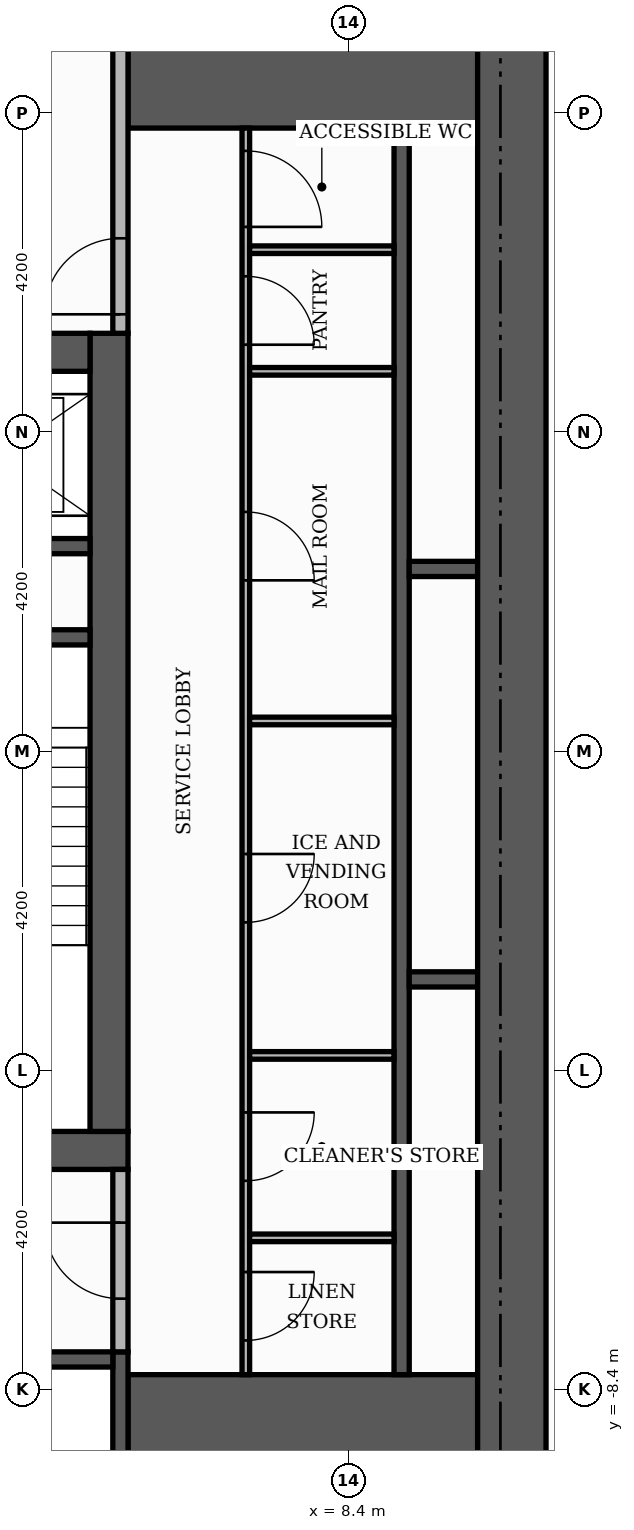
"""IFC4 building model, lengths in metres.
Left out: names, types, materials, properties, quantities, classifications, styles, units other than length and angle.
Written with IfcOpenShell. Run it as: python <this file> out.ifc"""

import sys

from ifc_helpers import new_model, si_unit, direction, frame, frame_2d, origin, place, context, subcontext, project, spatial, rectangle, extrude, element, fill, save


model = new_model("IFC4")
c1 = context("Model", 3, precision=1e-05, world=origin(), true_north=direction((0.0, 1.0)))
c2 = subcontext(c1, "Body", "Model", "MODEL_VIEW")
j1 = project(units=[si_unit("LENGTHUNIT", "METRE"), si_unit("PLANEANGLEUNIT", "RADIAN")], contexts=[c1])
p1 = place(None, origin())
s1 = spatial("IfcSite", under=j1, at=p1, CompositionType="ELEMENT")
p2 = place(p1, origin())
s2 = spatial("IfcBuilding", under=s1, at=p2, CompositionType="ELEMENT")
p3 = place(p2, frame((0.0, 0.0, 58.2)))
s3 = spatial("IfcBuildingStorey", under=s2, at=p3, CompositionType="ELEMENT", Elevation=58.2)
p4 = place(p3, frame((-5.5, -5.25, 0.0), z_axis=(0.0, 0.0, 1.0), x_axis=(1.0, 0.0, 0.0)))
e1 = element("IfcWall", 1, at=p4, inside=s3, PredefinedType="SHEAR", context=c2, shape_type="SweptSolid", body=[
    extrude(rectangle(XDim=11.0, YDim=0.5, at=frame_2d((5.5, 0.0))), origin(), (0.0, 0.0, 1.0), 3.48),
])
p5 = place(p4, frame((4.9, 0.0, 0.0)))
e2 = element("IfcOpeningElement", 2, at=p5, cuts=e1, PredefinedType="OPENING", context=c2, shape_type="SweptSolid", body=[
    extrude(rectangle(XDim=1.2, YDim=2.1, at=frame_2d((0.6, 1.05))), frame((0.0, 0.26, 0.0), z_axis=(0.0, -1.0, 0.0), x_axis=(1.0, 0.0, 0.0)), (0.0, 0.0, 1.0), 0.52),
])
p6 = place(p3, frame((5.25, -5.0, 0.0), z_axis=(0.0, 0.0, 1.0), x_axis=(0.0, 1.0, 0.0)))
e3 = element("IfcWall", 3, at=p6, inside=s3, PredefinedType="SHEAR", context=c2, shape_type="SweptSolid", body=[
    extrude(rectangle(XDim=10.5, YDim=0.5, at=frame_2d((5.25, 0.0))), origin(), (0.0, 0.0, 1.0), 3.48),
])
p7 = place(p3, frame((-5.0, 5.25, 0.0), z_axis=(0.0, 0.0, 1.0), x_axis=(1.0, 0.0, 0.0)))
e4 = element("IfcWall", 4, at=p7, inside=s3, PredefinedType="SHEAR", context=c2, shape_type="SweptSolid", body=[
    extrude(rectangle(XDim=10.0, YDim=0.5, at=frame_2d((5.0, 0.0))), origin(), (0.0, 0.0, 1.0), 3.48),
])
p8 = place(p7, frame((4.4, 0.0, 0.0)))
e5 = element("IfcOpeningElement", 5, at=p8, cuts=e4, PredefinedType="OPENING", context=c2, shape_type="SweptSolid", body=[
    extrude(rectangle(XDim=1.2, YDim=2.1, at=frame_2d((0.6, 1.05))), frame((0.0, 0.26, 0.0), z_axis=(0.0, -1.0, 0.0), x_axis=(1.0, 0.0, 0.0)), (0.0, 0.0, 1.0), 0.52),
])
for number, where, z_axis, x_axis in (
    (6, (5.5, -9.15, 0.0), (0.0, 0.0, 1.0), (1.0, 0.0, 0.0)),
    (7, (5.5, 9.15, 0.0), (0.0, 0.0, 1.0), (1.0, 0.0, 0.0)),
):
    element("IfcWall", number, at=place(p3, frame(where, z_axis=z_axis, x_axis=x_axis)), inside=s3, PredefinedType="SHEAR", context=c2, shape_type="SweptSolid", body=[
        extrude(rectangle(XDim=4.6, YDim=1.9, at=frame_2d((2.3, 0.0))), origin(), (0.0, 0.0, 1.0), 3.48),
    ])
p9 = place(p3, frame((2.15, 1.5, 0.0), z_axis=(0.0, 0.0, 1.0), x_axis=(1.0, 0.0, 0.0)))
e8 = element("IfcWall", 8, at=p9, inside=s3, PredefinedType="SHEAR", context=c2, shape_type="SweptSolid", body=[
    extrude(rectangle(XDim=2.85, YDim=0.2, at=frame_2d((1.425, 0.0))), origin(), (0.0, 0.0, 1.0), 3.48),
])
p10 = place(p3, frame((5.4, -10.1, 0.0), z_axis=(0.0, 0.0, 1.0), x_axis=(0.0, 1.0, 0.0)))
e9 = element("IfcWall", 9, at=p10, inside=s3, PredefinedType="SHEAR", context=c2, shape_type="SweptSolid", body=[
    extrude(rectangle(XDim=2.2, YDim=0.2, at=frame_2d((1.1, 0.0))), origin(), (0.0, 0.0, 1.0), 3.48),
])
p11 = place(p3, frame((9.1, -8.2, 0.0), z_axis=(0.0, 0.0, 1.0), x_axis=(0.0, 1.0, 0.0)))
e10 = element("IfcWall", 10, at=p11, inside=s3, PredefinedType="SHEAR", context=c2, shape_type="SweptSolid", body=[
    extrude(rectangle(XDim=16.4, YDim=0.2, at=frame_2d((8.2, 0.0))), origin(), (0.0, 0.0, 1.0), 3.48),
])
p12 = place(p3, frame((2.8, -8.0, 0.0), z_axis=(0.0, 0.0, 1.0), x_axis=(1.0, 0.0, 0.0)))
e11 = element("IfcWall", 11, at=p12, inside=s3, PredefinedType="SHEAR", context=c2, shape_type="SweptSolid", body=[
    extrude(rectangle(XDim=2.5, YDim=0.2, at=frame_2d((1.25, 0.0))), origin(), (0.0, 0.0, 1.0), 3.48),
])
for number, where, z_axis, x_axis in (
    (12, (9.2, -3.0, 0.0), (0.0, 0.0, 1.0), (1.0, 0.0, 0.0)),
    (13, (9.2, 2.4, 0.0), (0.0, 0.0, 1.0), (1.0, 0.0, 0.0)),
):
    element("IfcWall", number, at=place(p3, frame(where, z_axis=z_axis, x_axis=x_axis)), inside=s3, PredefinedType="SHEAR", context=c2, shape_type="SweptSolid", body=[
        extrude(rectangle(XDim=0.9, YDim=0.2, at=frame_2d((0.45, 0.0))), origin(), (0.0, 0.0, 1.0), 3.48),
    ])
p13 = place(p3, frame((2.15, 2.7, 0.0), z_axis=(0.0, 0.0, 1.0), x_axis=(1.0, 0.0, 0.0)))
e14 = element("IfcWall", 14, at=p13, inside=s3, PredefinedType="SHEAR", context=c2, shape_type="SweptSolid", body=[
    extrude(rectangle(XDim=2.85, YDim=0.2, at=frame_2d((1.425, 0.0))), origin(), (0.0, 0.0, 1.0), 3.48),
])
p14 = place(p3, frame((10.55, -10.1, 0.0), z_axis=(0.0, 0.0, 1.0), x_axis=(0.0, 1.0, 0.0)))
e15 = element("IfcWall", 15, at=p14, inside=s3, PredefinedType="SHEAR", context=c2, shape_type="SweptSolid", body=[
    extrude(rectangle(XDim=20.2, YDim=0.9, at=frame_2d((10.1, 0.0))), origin(), (0.0, 0.0, 1.0), 3.48),
])
p15 = place(p3, frame((7.05, -8.2, 0.0), z_axis=(0.0, 0.0, 1.0), x_axis=(0.0, 1.0, 0.0)))
e16 = element("IfcWall", 16, at=p15, inside=s3, PredefinedType="PARTITIONING", context=c2, shape_type="SweptSolid", body=[
    extrude(rectangle(XDim=16.4, YDim=0.1, at=frame_2d((8.2, 0.0))), origin(), (0.0, 0.0, 1.0), 3.48),
])
p16 = place(p15, frame((0.45, 0.0, 0.0)))
e17 = element("IfcOpeningElement", 17, at=p16, cuts=e16, PredefinedType="OPENING", context=c2, shape_type="SweptSolid", body=[
    extrude(rectangle(XDim=0.9, YDim=2.1, at=frame_2d((0.45, 1.05))), frame((0.0, 0.06, 0.0), z_axis=(0.0, -1.0, 0.0), x_axis=(1.0, 0.0, 0.0)), (0.0, 0.0, 1.0), 0.12),
])
p17 = place(p15, frame((2.55, 0.0, 0.0)))
e18 = element("IfcOpeningElement", 18, at=p17, cuts=e16, PredefinedType="OPENING", context=c2, shape_type="SweptSolid", body=[
    extrude(rectangle(XDim=0.9, YDim=2.1, at=frame_2d((0.45, 1.05))), frame((0.0, 0.06, 0.0), z_axis=(0.0, -1.0, 0.0), x_axis=(1.0, 0.0, 0.0)), (0.0, 0.0, 1.0), 0.12),
])
p18 = place(p15, frame((5.95, 0.0, 0.0)))
e19 = element("IfcOpeningElement", 19, at=p18, cuts=e16, PredefinedType="OPENING", context=c2, shape_type="SweptSolid", body=[
    extrude(rectangle(XDim=0.9, YDim=2.1, at=frame_2d((0.45, 1.05))), frame((0.0, 0.06, 0.0), z_axis=(0.0, -1.0, 0.0), x_axis=(1.0, 0.0, 0.0)), (0.0, 0.0, 1.0), 0.12),
])
p19 = place(p15, frame((10.45, 0.0, 0.0)))
e20 = element("IfcOpeningElement", 20, at=p19, cuts=e16, PredefinedType="OPENING", context=c2, shape_type="SweptSolid", body=[
    extrude(rectangle(XDim=0.9, YDim=2.1, at=frame_2d((0.45, 1.05))), frame((0.0, 0.06, 0.0), z_axis=(0.0, -1.0, 0.0), x_axis=(1.0, 0.0, 0.0)), (0.0, 0.0, 1.0), 0.12),
])
p20 = place(p15, frame((13.55, 0.0, 0.0)))
e21 = element("IfcOpeningElement", 21, at=p20, cuts=e16, PredefinedType="OPENING", context=c2, shape_type="SweptSolid", body=[
    extrude(rectangle(XDim=0.9, YDim=2.1, at=frame_2d((0.45, 1.05))), frame((0.0, 0.06, 0.0), z_axis=(0.0, -1.0, 0.0), x_axis=(1.0, 0.0, 0.0)), (0.0, 0.0, 1.0), 0.12),
])
p21 = place(p15, frame((15.1, 0.0, 0.0)))
e22 = element("IfcOpeningElement", 22, at=p21, cuts=e16, PredefinedType="OPENING", context=c2, shape_type="SweptSolid", body=[
    extrude(rectangle(XDim=1.0, YDim=2.1, at=frame_2d((0.5, 1.05))), frame((0.0, 0.06, 0.0), z_axis=(0.0, -1.0, 0.0), x_axis=(1.0, 0.0, 0.0)), (0.0, 0.0, 1.0), 0.12),
])
p22 = place(p3, frame((5.4, -7.9, 0.0), z_axis=(0.0, 0.0, 1.0), x_axis=(0.0, 1.0, 0.0)))
e23 = element("IfcWall", 23, at=p22, inside=s3, PredefinedType="PARTITIONING", context=c2, shape_type="SweptSolid", body=[
    extrude(rectangle(XDim=2.4, YDim=0.2, at=frame_2d((1.2, 0.0))), origin(), (0.0, 0.0, 1.0), 3.48),
])
p23 = place(p22, frame((0.7, 0.0, 0.0)))
e24 = element("IfcOpeningElement", 24, at=p23, cuts=e23, PredefinedType="OPENING", context=c2, shape_type="SweptSolid", body=[
    extrude(rectangle(XDim=1.0, YDim=2.1, at=frame_2d((0.5, 1.05))), frame((0.0, 0.11, 0.0), z_axis=(0.0, -1.0, 0.0), x_axis=(1.0, 0.0, 0.0)), (0.0, 0.0, 1.0), 0.22),
])
for number, where, z_axis, x_axis in (
    (25, (7.1, -6.4, 0.0), (0.0, 0.0, 1.0), (1.0, 0.0, 0.0)),
    (26, (7.1, -4.0, 0.0), (0.0, 0.0, 1.0), (1.0, 0.0, 0.0)),
    (27, (7.1, 0.4, 0.0), (0.0, 0.0, 1.0), (1.0, 0.0, 0.0)),
    (28, (7.1, 5.0, 0.0), (0.0, 0.0, 1.0), (1.0, 0.0, 0.0)),
):
    element("IfcWall", number, at=place(p3, frame(where, z_axis=z_axis, x_axis=x_axis)), inside=s3, PredefinedType="PARTITIONING", context=c2, shape_type="SweptSolid", body=[
        extrude(rectangle(XDim=1.9, YDim=0.1, at=frame_2d((0.95, 0.0))), origin(), (0.0, 0.0, 1.0), 3.48),
    ])
p24 = place(p3, frame((5.4, 5.5, 0.0), z_axis=(0.0, 0.0, 1.0), x_axis=(0.0, 1.0, 0.0)))
e29 = element("IfcWall", 29, at=p24, inside=s3, PredefinedType="PARTITIONING", context=c2, shape_type="SweptSolid", body=[
    extrude(rectangle(XDim=4.6, YDim=0.2, at=frame_2d((2.3, 0.0))), origin(), (0.0, 0.0, 1.0), 3.48),
])
p25 = place(p24, frame((0.25, 0.0, 0.0)))
e30 = element("IfcOpeningElement", 30, at=p25, cuts=e29, PredefinedType="OPENING", context=c2, shape_type="SweptSolid", body=[
    extrude(rectangle(XDim=1.0, YDim=2.1, at=frame_2d((0.5, 1.05))), frame((0.0, 0.11, 0.0), z_axis=(0.0, -1.0, 0.0), x_axis=(1.0, 0.0, 0.0)), (0.0, 0.0, 1.0), 0.22),
])
p26 = place(p3, frame((7.1, 6.6, 0.0), z_axis=(0.0, 0.0, 1.0), x_axis=(1.0, 0.0, 0.0)))
e31 = element("IfcWall", 31, at=p26, inside=s3, PredefinedType="PARTITIONING", context=c2, shape_type="SweptSolid", body=[
    extrude(rectangle(XDim=1.9, YDim=0.1, at=frame_2d((0.95, 0.0))), origin(), (0.0, 0.0, 1.0), 3.48),
])
p27 = place(p25, origin())
e32 = element("IfcDoor", 32, at=p27, inside=s3, OperationType="SINGLE_SWING_LEFT", PredefinedType="DOOR", context=c2, shape_type="SweptSolid", body=[
    extrude(rectangle(XDim=1.0, YDim=2.1, at=frame_2d((0.5, 1.05))), frame((0.0, 0.025, 0.0), z_axis=(0.0, -1.0, 0.0), x_axis=(1.0, 0.0, 0.0)), (0.0, 0.0, 1.0), 0.05),
])
fill(e30, e32)
p28 = place(p23, origin())
e33 = element("IfcDoor", 33, at=p28, inside=s3, OperationType="SINGLE_SWING_RIGHT", PredefinedType="DOOR", context=c2, shape_type="SweptSolid", body=[
    extrude(rectangle(XDim=1.0, YDim=2.1, at=frame_2d((0.5, 1.05))), frame((0.0, 0.025, 0.0), z_axis=(0.0, -1.0, 0.0), x_axis=(1.0, 0.0, 0.0)), (0.0, 0.0, 1.0), 0.05),
])
fill(e24, e33)
p29 = place(p16, frame((0.9, 0.0, 0.0), z_axis=(0.0, 0.0, 1.0), x_axis=(-1.0, 0.0, 0.0)))
e34 = element("IfcDoor", 34, at=p29, inside=s3, OperationType="SINGLE_SWING_RIGHT", PredefinedType="DOOR", context=c2, shape_type="SweptSolid", body=[
    extrude(rectangle(XDim=0.9, YDim=2.1, at=frame_2d((0.45, 1.05))), frame((0.0, 0.025, 0.0), z_axis=(0.0, -1.0, 0.0), x_axis=(1.0, 0.0, 0.0)), (0.0, 0.0, 1.0), 0.05),
])
fill(e17, e34)
p30 = place(p17, frame((0.9, 0.0, 0.0), z_axis=(0.0, 0.0, 1.0), x_axis=(-1.0, 0.0, 0.0)))
e35 = element("IfcDoor", 35, at=p30, inside=s3, OperationType="SINGLE_SWING_RIGHT", PredefinedType="DOOR", context=c2, shape_type="SweptSolid", body=[
    extrude(rectangle(XDim=0.9, YDim=2.1, at=frame_2d((0.45, 1.05))), frame((0.0, 0.025, 0.0), z_axis=(0.0, -1.0, 0.0), x_axis=(1.0, 0.0, 0.0)), (0.0, 0.0, 1.0), 0.05),
])
fill(e18, e35)
p31 = place(p18, frame((0.9, 0.0, 0.0), z_axis=(0.0, 0.0, 1.0), x_axis=(-1.0, 0.0, 0.0)))
e36 = element("IfcDoor", 36, at=p31, inside=s3, OperationType="SINGLE_SWING_RIGHT", PredefinedType="DOOR", context=c2, shape_type="SweptSolid", body=[
    extrude(rectangle(XDim=0.9, YDim=2.1, at=frame_2d((0.45, 1.05))), frame((0.0, 0.025, 0.0), z_axis=(0.0, -1.0, 0.0), x_axis=(1.0, 0.0, 0.0)), (0.0, 0.0, 1.0), 0.05),
])
fill(e19, e36)
p32 = place(p19, frame((0.9, 0.0, 0.0), z_axis=(0.0, 0.0, 1.0), x_axis=(-1.0, 0.0, 0.0)))
e37 = element("IfcDoor", 37, at=p32, inside=s3, OperationType="SINGLE_SWING_LEFT", PredefinedType="DOOR", context=c2, shape_type="SweptSolid", body=[
    extrude(rectangle(XDim=0.9, YDim=2.1, at=frame_2d((0.45, 1.05))), frame((0.0, 0.025, 0.0), z_axis=(0.0, -1.0, 0.0), x_axis=(1.0, 0.0, 0.0)), (0.0, 0.0, 1.0), 0.05),
])
fill(e20, e37)
p33 = place(p20, frame((0.9, 0.0, 0.0), z_axis=(0.0, 0.0, 1.0), x_axis=(-1.0, 0.0, 0.0)))
e38 = element("IfcDoor", 38, at=p33, inside=s3, OperationType="SINGLE_SWING_LEFT", PredefinedType="DOOR", context=c2, shape_type="SweptSolid", body=[
    extrude(rectangle(XDim=0.9, YDim=2.1, at=frame_2d((0.45, 1.05))), frame((0.0, 0.025, 0.0), z_axis=(0.0, -1.0, 0.0), x_axis=(1.0, 0.0, 0.0)), (0.0, 0.0, 1.0), 0.05),
])
fill(e21, e38)
p34 = place(p21, frame((1.0, 0.0, 0.0), z_axis=(0.0, 0.0, 1.0), x_axis=(-1.0, 0.0, 0.0)))
e39 = element("IfcDoor", 39, at=p34, inside=s3, OperationType="SINGLE_SWING_LEFT", PredefinedType="DOOR", context=c2, shape_type="SweptSolid", body=[
    extrude(rectangle(XDim=1.0, YDim=2.1, at=frame_2d((0.5, 1.05))), frame((0.0, 0.025, 0.0), z_axis=(0.0, -1.0, 0.0), x_axis=(1.0, 0.0, 0.0)), (0.0, 0.0, 1.0), 0.05),
])
fill(e22, e39)
save(model, sys.argv[1])
